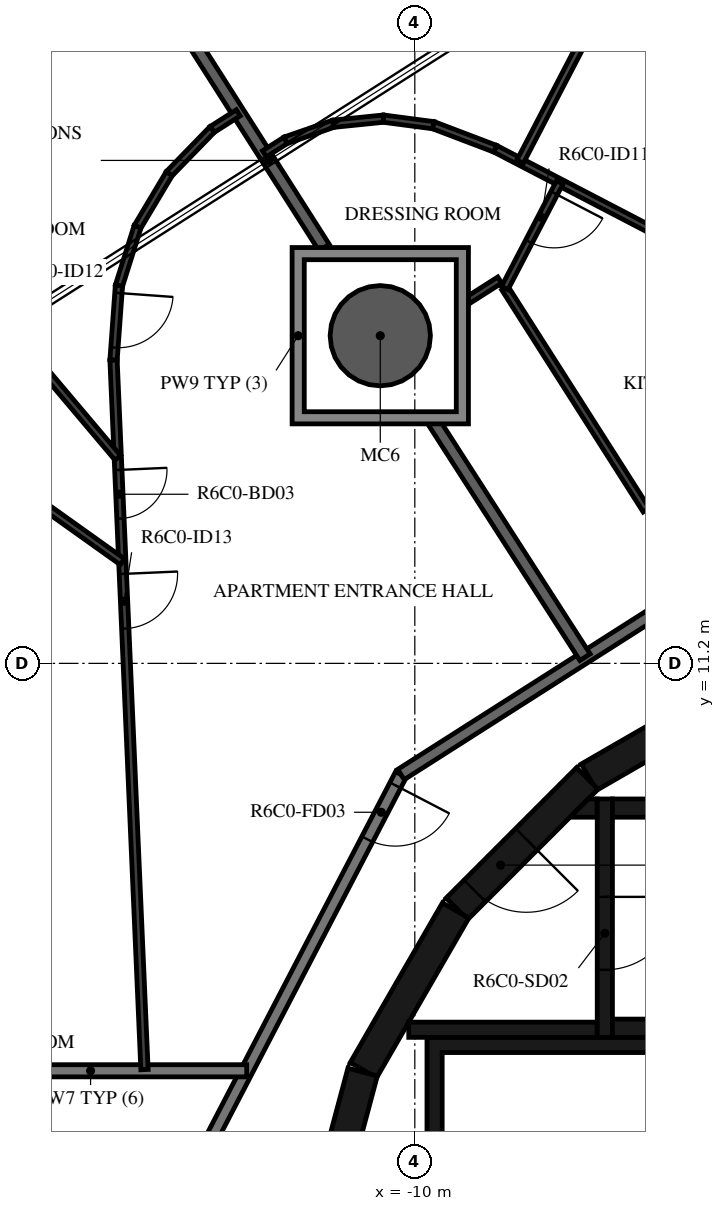
"""IFC4 building model, lengths in metres.
Left out: names, types, materials, properties, quantities, classifications, styles, units other than length and angle.
Written with IfcOpenShell. Run it as: python <this file> out.ifc"""

import sys

from ifc_helpers import new_model, si_unit, direction, frame, frame_2d, origin, origin_2d, place, context, subcontext, project, spatial, polyline, rectangle, hollow_circle, outline, extrude, element, fill, save


model = new_model("IFC4")
c1 = context("Model", 3, precision=1e-05, world=origin(), true_north=direction((0.0, 1.0)))
c2 = subcontext(c1, "Body", "Model", "MODEL_VIEW")
j1 = project(units=[si_unit("LENGTHUNIT", "METRE"), si_unit("PLANEANGLEUNIT", "RADIAN")], contexts=[c1])
p1 = place(None, origin())
s1 = spatial("IfcSite", under=j1, at=p1, CompositionType="ELEMENT")
p2 = place(p1, origin())
s2 = spatial("IfcBuilding", under=s1, at=p2, CompositionType="ELEMENT")
p3 = place(p2, frame((0.0, 0.0, 247.7)))
s3 = spatial("IfcBuildingStorey", under=s2, at=p3, CompositionType="ELEMENT", Elevation=247.7)
p4 = place(p3, frame((-10.568, 16.588, -0.38), z_axis=(0.0, 0.0, 1.0), x_axis=(1.0, 0.0, 0.0)))
e1 = element("IfcColumn", 1, at=p4, inside=s3, PredefinedType="COLUMN", context=c2, shape_type="SweptSolid", body=[
    extrude(hollow_circle(Radius=0.825, WallThickness=0.04, at=origin_2d()), origin(), (0.0, 0.0, 1.0), 3.5),
])
p5 = place(p3, frame((-4.51, 10.845, 0.0), z_axis=(0.0, 0.0, 1.0), x_axis=(-0.865975092491, -0.500087131594, 0.0)))
e2 = element("IfcWall", 2, at=p5, inside=s3, PredefinedType="SHEAR", context=c2, shape_type="SweptSolid", body=[
    extrude(rectangle(XDim=3.033, YDim=0.5, at=frame_2d((1.516, 0.0))), origin(), (0.0, 0.0, 1.0), 3.12),
])
p6 = place(p3, frame((-7.164, 9.308, 0.0), z_axis=(0.0, 0.0, 1.0), x_axis=(-0.707106781187, -0.707106781187, 0.0)))
e3 = element("IfcWall", 3, at=p6, inside=s3, PredefinedType="SHEAR", context=c2, shape_type="SweptSolid", body=[
    extrude(rectangle(XDim=3.032, YDim=0.5, at=frame_2d((1.516, 0.0))), origin(), (0.0, 0.0, 1.0), 3.12),
])
p7 = place(p6, frame((1.416, 0.0, 0.0)))
e4 = element("IfcOpeningElement", 4, at=p7, cuts=e3, PredefinedType="OPENING", context=c2, shape_type="SweptSolid", body=[
    extrude(rectangle(XDim=1.2, YDim=2.1, at=frame_2d((0.6, 1.05))), frame((0.0, 0.26, 0.0), z_axis=(0.0, -1.0, 0.0), x_axis=(1.0, 0.0, 0.0)), (0.0, 0.0, 1.0), 0.52),
])
for number, where, z_axis, x_axis in (
    (5, (-9.329, 7.137, 0.0), (0.0, 0.0, 1.0), (-0.5, -0.866, 0.0)),
    (6, (-10.858, 4.479, 0.0), (0.0, 0.0, 1.0), (-0.259, -0.966, 0.0)),
):
    element("IfcWall", number, at=place(p3, frame(where, z_axis=z_axis, x_axis=x_axis)), inside=s3, PredefinedType="SHEAR", context=c2, shape_type="SweptSolid", body=[
        extrude(rectangle(XDim=3.033, YDim=0.5, at=frame_2d((1.516, 0.0))), origin(), (0.0, 0.0, 1.0), 3.12),
    ])
for number, where, z_axis, x_axis in (
    (7, (-6.75, 5.2, 0.0), (0.0, 0.0, 1.0), (1.0, 0.0, 0.0)),
    (8, (-6.75, 8.82, 0.0), (0.0, 0.0, 1.0), (1.0, 0.0, 0.0)),
):
    element("IfcWall", number, at=place(p3, frame(where, z_axis=z_axis, x_axis=x_axis)), inside=s3, PredefinedType="SHEAR", context=c2, shape_type="SweptSolid", body=[
        extrude(rectangle(XDim=6.75, YDim=0.3, at=frame_2d((3.375, 0.0))), origin(), (0.0, 0.0, 1.0), 3.12),
    ])
p8 = place(p3, frame((-6.875, 8.97, 0.0), z_axis=(0.0, 0.0, 1.0), x_axis=(0.0, -1.0, 0.0)))
e9 = element("IfcWall", 9, at=p8, inside=s3, PredefinedType="SHEAR", context=c2, shape_type="SweptSolid", body=[
    extrude(rectangle(XDim=3.92, YDim=0.25, at=frame_2d((1.96, 0.0))), origin(), (0.0, 0.0, 1.0), 3.12),
])
p9 = place(p8, frame((1.61, 0.0, 0.0)))
e10 = element("IfcOpeningElement", 10, at=p9, cuts=e9, PredefinedType="OPENING", context=c2, shape_type="SweptSolid", body=[
    extrude(rectangle(XDim=1.2, YDim=2.1, at=frame_2d((0.6, 1.05))), frame((0.0, 0.135, 0.0), z_axis=(0.0, -1.0, 0.0), x_axis=(1.0, 0.0, 0.0)), (0.0, 0.0, 1.0), 0.27),
])
p10 = place(p3, frame((-7.0, 5.175, 0.0), z_axis=(0.0, 0.0, 1.0), x_axis=(-1.0, 0.0, 0.0)))
e11 = element("IfcWall", 11, at=p10, inside=s3, PredefinedType="SHEAR", context=c2, shape_type="SweptSolid", body=[
    extrude(rectangle(XDim=3.1, YDim=0.25, at=frame_2d((1.55, 0.0))), origin(), (0.0, 0.0, 1.0), 3.12),
])
p11 = place(p3, origin())
e12 = element("IfcWall", 12, at=p11, inside=s3, PredefinedType="SHEAR", context=c2, shape_type="SweptSolid", body=[
    extrude(outline(polyline([(-7.148, 8.97), (-7.0, 8.97), (-7.0, 8.67), (-7.448, 8.67), (-7.148, 8.97)])), origin(), (0.0, 0.0, 1.0), 3.12),
])
p12 = place(p3, origin())
e13 = element("IfcWall", 13, at=p12, inside=s3, PredefinedType="SHEAR", context=c2, shape_type="SweptSolid", body=[
    extrude(outline(polyline([(-9.55, 4.8), (-1.2, 4.8), (-1.2, 1.9), (-0.95, 1.9), (-0.95, 4.8), (0.95, 4.8), (0.95, 1.9), (1.2, 1.9), (1.2, 4.8), (3.1, 4.8), (3.1, 1.9), (3.35, 1.9), (3.35, 4.8), (5.25, 4.8), (5.25, 1.9), (5.5, 1.9), (5.5, 4.8), (7.4, 4.8), (7.4, 1.9), (7.65, 1.9), (7.65, 4.8), (9.55, 4.8), (9.55, 1.9), (9.8, 1.9), (9.8, 4.8), (9.8, 5.05), (-9.8, 5.05), (-9.8, 4.8), (-9.8, 1.9), (-9.55, 1.9), (-9.55, 4.8)])), origin(), (0.0, 0.0, 1.0), 3.12),
])
p13 = place(p3, frame((-10.228, 9.372, 0.0), z_axis=(0.0, 0.0, 1.0), x_axis=(-0.461759464021, -0.887005184532, 0.0)))
e14 = element("IfcWall", 14, at=p13, inside=s3, PredefinedType="STANDARD", context=c2, shape_type="SweptSolid", body=[
    extrude(rectangle(XDim=7.181, YDim=0.2, at=frame_2d((3.591, 0.0))), origin(), (0.0, 0.0, 1.0), 3.12),
])
p14 = place(p13, frame((0.2, 0.0, 0.0)))
e15 = element("IfcOpeningElement", 15, at=p14, cuts=e14, PredefinedType="OPENING", context=c2, shape_type="SweptSolid", body=[
    extrude(rectangle(XDim=1.0, YDim=2.1, at=frame_2d((0.5, 1.05))), frame((0.0, 0.11, 0.0), z_axis=(0.0, -1.0, 0.0), x_axis=(1.0, 0.0, 0.0)), (0.0, 0.0, 1.0), 0.22),
])
p15 = place(p3, frame((-4.172, 13.231, 0.0), z_axis=(0.0, 0.0, 1.0), x_axis=(-0.843388394728, -0.537304397561, 0.0)))
e16 = element("IfcWall", 16, at=p15, inside=s3, PredefinedType="STANDARD", context=c2, shape_type="SweptSolid", body=[
    extrude(rectangle(XDim=7.181, YDim=0.2, at=frame_2d((3.59, 0.0))), origin(), (0.0, 0.0, 1.0), 3.12),
])
p16 = place(p3, frame((-12.764, 4.5, 0.0), z_axis=(0.0, 0.0, 1.0), x_axis=(-1.0, 0.0, 0.0)))
e17 = element("IfcWall", 17, at=p16, inside=s3, PredefinedType="STANDARD", context=c2, shape_type="SweptSolid", body=[
    extrude(rectangle(XDim=5.135, YDim=0.2, at=frame_2d((2.568, 0.0))), origin(), (0.0, 0.0, 1.0), 3.12),
])
p17 = place(p3, frame((-9.69, 15.171, 0.0), z_axis=(0.0, 0.0, 1.0), x_axis=(0.540961372678, -0.841047438181, 0.0)))
e18 = element("IfcWall", 18, at=p17, inside=s3, PredefinedType="STANDARD", context=c2, shape_type="SweptSolid", body=[
    extrude(rectangle(XDim=4.602, YDim=0.2, at=frame_2d((2.301, 0.0))), origin(), (0.0, 0.0, 1.0), 3.12),
])
p18 = place(p3, frame((-14.837, 23.29, 0.0), z_axis=(0.0, 0.0, 1.0), x_axis=(0.537316863221, -0.843380452998, 0.0)))
e19 = element("IfcWall", 19, at=p18, inside=s3, PredefinedType="STANDARD", context=c2, shape_type="SweptSolid", body=[
    extrude(rectangle(XDim=6.227, YDim=0.2, at=frame_2d((3.113, 0.0))), origin(), (0.0, 0.0, 1.0), 3.12),
])
p19 = place(p3, frame((-4.888, 14.553, 0.0), z_axis=(0.0, 0.0, 1.0), x_axis=(-0.843349608892, -0.537365273517, 0.0)))
e20 = element("IfcWall", 20, at=p19, inside=s3, PredefinedType="PARTITIONING", context=c2, shape_type="SweptSolid", body=[
    extrude(rectangle(XDim=1.548, YDim=0.12, at=frame_2d((0.774, 0.0))), origin(), (0.0, 0.0, 1.0), 3.12),
])
p20 = place(p19, frame((0.2, 0.0, 0.0)))
e21 = element("IfcOpeningElement", 21, at=p20, cuts=e20, PredefinedType="OPENING", context=c2, shape_type="SweptSolid", body=[
    extrude(rectangle(XDim=0.9, YDim=2.1, at=frame_2d((0.45, 1.05))), frame((0.0, 0.07, 0.0), z_axis=(0.0, -1.0, 0.0), x_axis=(1.0, 0.0, 0.0)), (0.0, 0.0, 1.0), 0.14),
])
p21 = place(p3, frame((-6.194, 13.721, 0.0), z_axis=(0.0, 0.0, 1.0), x_axis=(-0.537316807294, 0.843380488629, 0.0)))
e22 = element("IfcWall", 22, at=p21, inside=s3, PredefinedType="PARTITIONING", context=c2, shape_type="SweptSolid", body=[
    extrude(rectangle(XDim=4.331, YDim=0.12, at=frame_2d((2.165, 0.0))), origin(), (0.0, 0.0, 1.0), 3.12),
])
p22 = place(p3, frame((-8.604, 17.504, 0.0), z_axis=(0.0, 0.0, 1.0), x_axis=(-0.843265746233, -0.537496866251, 0.0)))
e23 = element("IfcWall", 23, at=p22, inside=s3, PredefinedType="PARTITIONING", context=c2, shape_type="SweptSolid", body=[
    extrude(rectangle(XDim=0.61, YDim=0.12, at=frame_2d((0.305, 0.0))), origin(), (0.0, 0.0, 1.0), 3.12),
])
p23 = place(p3, frame((0.41, 14.932, 0.0), z_axis=(0.0, 0.0, 1.0), x_axis=(-0.887012293034, 0.461745808867, 0.0)))
e24 = element("IfcWall", 24, at=p23, inside=s3, PredefinedType="PARTITIONING", context=c2, shape_type="SweptSolid", body=[
    extrude(rectangle(XDim=10.246, YDim=0.12, at=frame_2d((5.123, 0.0))), origin(), (0.0, 0.0, 1.0), 3.12),
])
p24 = place(p23, frame((4.725, 0.0, 0.0)))
e25 = element("IfcOpeningElement", 25, at=p24, cuts=e24, PredefinedType="OPENING", context=c2, shape_type="SweptSolid", body=[
    extrude(rectangle(XDim=0.9, YDim=2.1, at=frame_2d((0.45, 1.05))), frame((0.0, 0.07, 0.0), z_axis=(0.0, -1.0, 0.0), x_axis=(1.0, 0.0, 0.0)), (0.0, 0.0, 1.0), 0.14),
])
p25 = place(p3, frame((-6.237, 23.353, 0.0), z_axis=(0.0, 0.0, 1.0), x_axis=(-0.461714347673, -0.88702866986, 0.0)))
e26 = element("IfcWall", 26, at=p25, inside=s3, PredefinedType="PARTITIONING", context=c2, shape_type="SweptSolid", body=[
    extrude(rectangle(XDim=4.4, YDim=0.12, at=frame_2d((2.2, 0.0))), origin(), (0.0, 0.0, 1.0), 2.73),
])
p26 = place(p25, frame((0.2, 0.0, 0.0)))
e27 = element("IfcOpeningElement", 27, at=p26, cuts=e26, PredefinedType="OPENING", context=c2, shape_type="SweptSolid", body=[
    extrude(rectangle(XDim=0.9, YDim=2.1, at=frame_2d((0.45, 1.05))), frame((0.0, 0.07, 0.0), z_axis=(0.0, -1.0, 0.0), x_axis=(1.0, 0.0, 0.0)), (0.0, 0.0, 1.0), 0.14),
])
p27 = place(p3, frame((-7.616, 19.11, 0.0), z_axis=(0.0, 0.0, 1.0), x_axis=(-0.461764840073, -0.887002385832, 0.0)))
e28 = element("IfcWall", 28, at=p27, inside=s3, PredefinedType="PARTITIONING", context=c2, shape_type="SweptSolid", body=[
    extrude(rectangle(XDim=1.958, YDim=0.12, at=frame_2d((0.979, 0.0))), origin(), (0.0, 0.0, 1.0), 3.12),
])
p28 = place(p27, frame((0.2, 0.0, 0.0)))
e29 = element("IfcOpeningElement", 29, at=p28, cuts=e28, PredefinedType="OPENING", context=c2, shape_type="SweptSolid", body=[
    extrude(rectangle(XDim=0.9, YDim=2.1, at=frame_2d((0.45, 1.05))), frame((0.0, 0.07, 0.0), z_axis=(0.0, -1.0, 0.0), x_axis=(1.0, 0.0, 0.0)), (0.0, 0.0, 1.0), 0.14),
])
p29 = place(p3, frame((-12.473, 19.579, 0.0), z_axis=(0.0, 0.0, 1.0), x_axis=(0.843467404643, 0.537180358264, 0.0)))
e30 = element("IfcWall", 30, at=p29, inside=s3, PredefinedType="PARTITIONING", context=c2, shape_type="SweptSolid", body=[
    extrude(rectangle(XDim=0.415, YDim=0.12, at=frame_2d((0.207, 0.0))), origin(), (0.0, 0.0, 1.0), 3.12),
])
for number, where, z_axis, x_axis in (
    (31, (-12.124, 19.802, 0.0), (0.0, 0.0, 1.0), (0.945, 0.328, 0.0)),
    (32, (-11.341, 20.074, 0.0), (0.0, 0.0, 1.0), (0.995, 0.102, 0.0)),
    (33, (-10.516, 20.158, 0.0), (0.0, 0.0, 1.0), (0.991, -0.131, 0.0)),
):
    element("IfcWall", number, at=place(p3, frame(where, z_axis=z_axis, x_axis=x_axis)), inside=s3, PredefinedType="PARTITIONING", context=c2, shape_type="SweptSolid", body=[
        extrude(rectangle(XDim=0.829, YDim=0.12, at=frame_2d((0.415, 0.0))), origin(), (0.0, 0.0, 1.0), 3.12),
    ])
p30 = place(p3, frame((-9.694, 20.05, 0.0), z_axis=(0.0, 0.0, 1.0), x_axis=(0.934647766222, -0.35557496129, 0.0)))
e34 = element("IfcWall", 34, at=p30, inside=s3, PredefinedType="PARTITIONING", context=c2, shape_type="SweptSolid", body=[
    extrude(rectangle(XDim=1.087, YDim=0.12, at=frame_2d((0.543, 0.0))), origin(), (0.0, 0.0, 1.0), 3.12),
])
p31 = place(p3, frame((-12.903, 20.254, 0.0), z_axis=(0.0, 0.0, 1.0), x_axis=(-0.843404143432, -0.537279676557, 0.0)))
e35 = element("IfcWall", 35, at=p31, inside=s3, PredefinedType="PARTITIONING", context=c2, shape_type="SweptSolid", body=[
    extrude(rectangle(XDim=0.508, YDim=0.12, at=frame_2d((0.254, 0.0))), origin(), (0.0, 0.0, 1.0), 3.12),
])
for number, where, z_axis, x_axis in (
    (36, (-13.332, 19.981, 0.0), (0.0, 0.0, 1.0), (-0.697, -0.717, 0.0)),
    (37, (-14.039, 19.252, 0.0), (0.0, 0.0, 1.0), (-0.513, -0.859, 0.0)),
    (38, (-14.56, 18.38, 0.0), (0.0, 0.0, 1.0), (-0.301, -0.954, 0.0)),
):
    element("IfcWall", number, at=place(p3, frame(where, z_axis=z_axis, x_axis=x_axis)), inside=s3, PredefinedType="PARTITIONING", context=c2, shape_type="SweptSolid", body=[
        extrude(rectangle(XDim=1.016, YDim=0.12, at=frame_2d((0.508, 0.0))), origin(), (0.0, 0.0, 1.0), 3.12),
    ])
p32 = place(p3, frame((-14.865, 17.411, 0.0), z_axis=(0.0, 0.0, 1.0), x_axis=(-0.072618457011, -0.997359794508, 0.0)))
e39 = element("IfcWall", 39, at=p32, inside=s3, PredefinedType="PARTITIONING", context=c2, shape_type="SweptSolid", body=[
    extrude(rectangle(XDim=1.227, YDim=0.12, at=frame_2d((0.614, 0.0))), origin(), (0.0, 0.0, 1.0), 3.12),
])
p33 = place(p32, frame((0.12, 0.0, 0.0)))
e40 = element("IfcOpeningElement", 40, at=p33, cuts=e39, PredefinedType="OPENING", context=c2, shape_type="SweptSolid", body=[
    extrude(rectangle(XDim=0.9, YDim=2.1, at=frame_2d((0.45, 1.05))), frame((0.0, 0.07, 0.0), z_axis=(0.0, -1.0, 0.0), x_axis=(1.0, 0.0, 0.0)), (0.0, 0.0, 1.0), 0.14),
])
p34 = place(p3, frame((-14.955, 16.187, 0.0), z_axis=(0.0, 0.0, 1.0), x_axis=(0.04360777668, -0.999048728448, 0.0)))
e41 = element("IfcWall", 41, at=p34, inside=s3, PredefinedType="PARTITIONING", context=c2, shape_type="SweptSolid", body=[
    extrude(rectangle(XDim=11.679, YDim=0.12, at=frame_2d((5.839, 0.0))), origin(), (0.0, 0.0, 1.0), 3.12),
])
p35 = place(p34, frame((1.808, 0.0, 0.0)))
e42 = element("IfcOpeningElement", 42, at=p35, cuts=e41, PredefinedType="OPENING", context=c2, shape_type="SweptSolid", body=[
    extrude(rectangle(XDim=0.8, YDim=2.1, at=frame_2d((0.4, 1.05))), frame((0.0, 0.07, 0.0), z_axis=(0.0, -1.0, 0.0), x_axis=(1.0, 0.0, 0.0)), (0.0, 0.0, 1.0), 0.14),
])
p36 = place(p34, frame((3.519, 0.0, 0.0)))
e43 = element("IfcOpeningElement", 43, at=p36, cuts=e41, PredefinedType="OPENING", context=c2, shape_type="SweptSolid", body=[
    extrude(rectangle(XDim=0.9, YDim=2.1, at=frame_2d((0.45, 1.05))), frame((0.0, 0.07, 0.0), z_axis=(0.0, -1.0, 0.0), x_axis=(1.0, 0.0, 0.0)), (0.0, 0.0, 1.0), 0.14),
])
p37 = place(p3, frame((-18.269, 18.589, 0.0), z_axis=(0.0, 0.0, 1.0), x_axis=(0.645124067673, -0.764077834588, 0.0)))
e44 = element("IfcWall", 44, at=p37, inside=s3, PredefinedType="PARTITIONING", context=c2, shape_type="SweptSolid", body=[
    extrude(rectangle(XDim=5.246, YDim=0.12, at=frame_2d((2.623, 0.0))), origin(), (0.0, 0.0, 1.0), 3.12),
])
p38 = place(p3, frame((-18.529, 15.522, 0.0), z_axis=(0.0, 0.0, 1.0), x_axis=(0.814350646776, -0.580373176582, 0.0)))
e45 = element("IfcWall", 45, at=p38, inside=s3, PredefinedType="PARTITIONING", context=c2, shape_type="SweptSolid", body=[
    extrude(rectangle(XDim=4.567, YDim=0.12, at=frame_2d((2.284, 0.0))), origin(), (0.0, 0.0, 1.0), 3.12),
])
p39 = place(p3, origin())
e46 = element("IfcWall", 46, at=p39, inside=s3, PredefinedType="STANDARD", context=c2, shape_type="SweptSolid", body=[
    extrude(outline(polyline([(-9.118, 18.038), (-9.118, 15.138), (-12.018, 15.138), (-12.018, 18.038), (-9.118, 18.038)]), holes=[polyline([(-11.818, 15.338), (-9.318, 15.338), (-9.318, 17.838), (-11.818, 17.838), (-11.818, 15.338)])]), origin(), (0.0, 0.0, 1.0), 3.12),
])
p40 = place(p9, origin())
e47 = element("IfcDoor", 47, at=p40, inside=s3, OperationType="SINGLE_SWING_LEFT", PredefinedType="DOOR", context=c2, shape_type="SweptSolid", body=[
    extrude(rectangle(XDim=1.2, YDim=2.1, at=frame_2d((0.6, 1.05))), frame((0.0, 0.025, 0.0), z_axis=(0.0, -1.0, 0.0), x_axis=(1.0, 0.0, 0.0)), (0.0, 0.0, 1.0), 0.05),
])
fill(e10, e47)
p41 = place(p7, origin())
e48 = element("IfcDoor", 48, at=p41, inside=s3, OperationType="SINGLE_SWING_RIGHT", PredefinedType="DOOR", context=c2, shape_type="SweptSolid", body=[
    extrude(rectangle(XDim=1.2, YDim=2.1, at=frame_2d((0.6, 1.05))), frame((0.0, 0.025, 0.0), z_axis=(0.0, -1.0, 0.0), x_axis=(1.0, 0.0, 0.0)), (0.0, 0.0, 1.0), 0.05),
])
fill(e4, e48)
p42 = place(p28, origin())
e49 = element("IfcDoor", 49, at=p42, inside=s3, OperationType="SINGLE_SWING_RIGHT", PredefinedType="DOOR", context=c2, shape_type="SweptSolid", body=[
    extrude(rectangle(XDim=0.9, YDim=2.1, at=frame_2d((0.45, 1.05))), frame((0.0, 0.025, 0.0), z_axis=(0.0, -1.0, 0.0), x_axis=(1.0, 0.0, 0.0)), (0.0, 0.0, 1.0), 0.05),
])
fill(e29, e49)
p43 = place(p14, origin())
e50 = element("IfcDoor", 50, at=p43, inside=s3, OperationType="SINGLE_SWING_LEFT", PredefinedType="DOOR", context=c2, shape_type="SweptSolid", body=[
    extrude(rectangle(XDim=1.0, YDim=2.1, at=frame_2d((0.5, 1.05))), frame((0.0, 0.025, 0.0), z_axis=(0.0, -1.0, 0.0), x_axis=(1.0, 0.0, 0.0)), (0.0, 0.0, 1.0), 0.05),
])
fill(e15, e50)
p44 = place(p33, origin())
e51 = element("IfcDoor", 51, at=p44, inside=s3, OperationType="SINGLE_SWING_LEFT", PredefinedType="DOOR", context=c2, shape_type="SweptSolid", body=[
    extrude(rectangle(XDim=0.9, YDim=2.1, at=frame_2d((0.45, 1.05))), frame((0.0, 0.025, 0.0), z_axis=(0.0, -1.0, 0.0), x_axis=(1.0, 0.0, 0.0)), (0.0, 0.0, 1.0), 0.05),
])
fill(e40, e51)
p45 = place(p35, origin())
e52 = element("IfcDoor", 52, at=p45, inside=s3, OperationType="SINGLE_SWING_LEFT", PredefinedType="DOOR", context=c2, shape_type="SweptSolid", body=[
    extrude(rectangle(XDim=0.8, YDim=2.1, at=frame_2d((0.4, 1.05))), frame((0.0, 0.025, 0.0), z_axis=(0.0, -1.0, 0.0), x_axis=(1.0, 0.0, 0.0)), (0.0, 0.0, 1.0), 0.05),
])
fill(e42, e52)
p46 = place(p36, origin())
e53 = element("IfcDoor", 53, at=p46, inside=s3, OperationType="SINGLE_SWING_LEFT", PredefinedType="DOOR", context=c2, shape_type="SweptSolid", body=[
    extrude(rectangle(XDim=0.9, YDim=2.1, at=frame_2d((0.45, 1.05))), frame((0.0, 0.025, 0.0), z_axis=(0.0, -1.0, 0.0), x_axis=(1.0, 0.0, 0.0)), (0.0, 0.0, 1.0), 0.05),
])
fill(e43, e53)
save(model, sys.argv[1])
